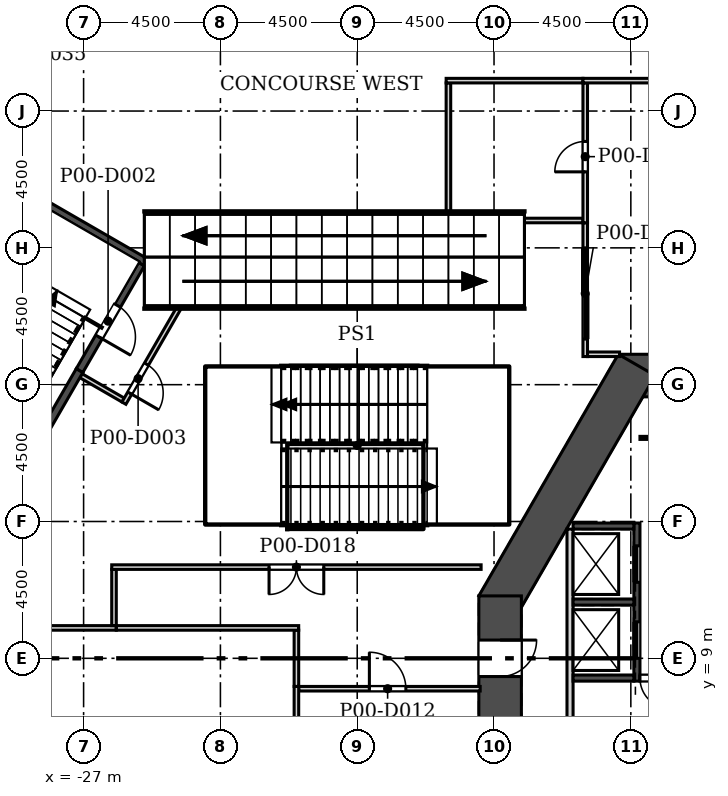
"""IFC4 building model, lengths in metres.
Left out: names, types, materials, properties, quantities, classifications, styles, units other than length and angle.
Written with IfcOpenShell. Run it as: python <this file> out.ifc"""

import sys

from ifc_helpers import new_model, si_unit, direction, frame, frame_2d, origin, place, context, subcontext, project, spatial, rectangle, extrude, element, fill, save


model = new_model("IFC4")
c1 = context("Model", 3, precision=1e-05, world=origin(), true_north=direction((0.0, 1.0)))
c2 = subcontext(c1, "Body", "Model", "MODEL_VIEW")
j1 = project(units=[si_unit("LENGTHUNIT", "METRE"), si_unit("PLANEANGLEUNIT", "RADIAN")], contexts=[c1])
p1 = place(None, origin())
s1 = spatial("IfcSite", under=j1, at=p1, CompositionType="ELEMENT")
p2 = place(p1, origin())
s2 = spatial("IfcBuilding", under=s1, at=p2, CompositionType="ELEMENT")
p3 = place(p2, origin())
s3 = spatial("IfcBuildingStorey", under=s2, at=p3, CompositionType="ELEMENT", Elevation=0.0)
p4 = place(p3, frame((9.412, 18.3, 0.0), z_axis=(0.0, 0.0, 1.0), x_axis=(-1.0, 0.0, 0.0)))
e1 = element("IfcWall", 1, at=p4, inside=s3, PredefinedType="SHEAR", context=c2, shape_type="SweptSolid", body=[
    extrude(rectangle(XDim=18.823, YDim=1.4, at=frame_2d((9.412, 0.0))), origin(), (0.0, 0.0, 1.0), 8.0),
])
p5 = place(p4, frame((8.711, 0.0, 0.0)))
e2 = element("IfcOpeningElement", 2, at=p5, cuts=e1, PredefinedType="OPENING", context=c2, shape_type="SweptSolid", body=[
    extrude(rectangle(XDim=1.4, YDim=2.1, at=frame_2d((0.7, 1.05))), frame((0.0, 0.71, 0.0), z_axis=(0.0, -1.0, 0.0), x_axis=(1.0, 0.0, 0.0)), (0.0, 0.0, 1.0), 1.42),
])
p6 = place(p4, frame((11.412, 0.0, 0.0)))
e3 = element("IfcOpeningElement", 3, at=p6, cuts=e1, PredefinedType="OPENING", context=c2, shape_type="SweptSolid", body=[
    extrude(rectangle(XDim=6.0, YDim=2.4, at=frame_2d((3.0, 1.2))), frame((0.0, 0.71, 0.0), z_axis=(0.0, -1.0, 0.0), x_axis=(1.0, 0.0, 0.0)), (0.0, 0.0, 1.0), 1.42),
])
p7 = place(p4, frame((1.412, 0.0, 0.0)))
e4 = element("IfcOpeningElement", 4, at=p7, cuts=e1, PredefinedType="OPENING", context=c2, shape_type="SweptSolid", body=[
    extrude(rectangle(XDim=6.0, YDim=2.4, at=frame_2d((3.0, 1.2))), frame((0.0, 0.71, 0.0), z_axis=(0.0, -1.0, 0.0), x_axis=(1.0, 0.0, 0.0)), (0.0, 0.0, 1.0), 1.42),
])
p8 = place(p3, frame((-8.805, 18.65, 0.0), z_axis=(0.0, 0.0, 1.0), x_axis=(-0.50000187635, -0.866024320471, 0.0)))
e5 = element("IfcWall", 5, at=p8, inside=s3, PredefinedType="SHEAR", context=c2, shape_type="SweptSolid", body=[
    extrude(rectangle(XDim=9.177, YDim=1.4, at=frame_2d((4.588, 0.0))), origin(), (0.0, 0.0, 1.0), 8.0),
])
p9 = place(p3, frame((-13.3, 11.052, 0.0), z_axis=(0.0, 0.0, 1.0), x_axis=(0.0, -1.0, 0.0)))
e6 = element("IfcWall", 6, at=p9, inside=s3, PredefinedType="SHEAR", context=c2, shape_type="SweptSolid", body=[
    extrude(rectangle(XDim=10.202, YDim=1.4, at=frame_2d((5.101, 0.0))), origin(), (0.0, 0.0, 1.0), 8.0),
])
p10 = place(p9, frame((5.453, 0.0, 0.0)))
e7 = element("IfcOpeningElement", 7, at=p10, cuts=e6, PredefinedType="OPENING", context=c2, shape_type="SweptSolid", body=[
    extrude(rectangle(XDim=1.2, YDim=2.1, at=frame_2d((0.6, 1.05))), frame((0.0, 0.71, 0.0), z_axis=(0.0, -1.0, 0.0), x_axis=(1.0, 0.0, 0.0)), (0.0, 0.0, 1.0), 1.42),
])
p11 = place(p9, frame((1.453, 0.0, 0.0)))
e8 = element("IfcOpeningElement", 8, at=p11, cuts=e6, PredefinedType="OPENING", context=c2, shape_type="SweptSolid", body=[
    extrude(rectangle(XDim=1.2, YDim=2.1, at=frame_2d((0.6, 1.05))), frame((0.0, 0.71, 0.0), z_axis=(0.0, -1.0, 0.0), x_axis=(1.0, 0.0, 0.0)), (0.0, 0.0, 1.0), 1.42),
])
p12 = place(p3, frame((-11.0, 5.85, 0.0), z_axis=(0.0, 0.0, 1.0), x_axis=(0.0, 1.0, 0.0)))
e9 = element("IfcWall", 9, at=p12, inside=s3, PredefinedType="SOLIDWALL", context=c2, shape_type="SweptSolid", body=[
    extrude(rectangle(XDim=7.4, YDim=0.2, at=frame_2d((3.7, 0.0))), origin(), (0.0, 0.0, 1.0), 7.7),
])
p13 = place(p3, frame((-8.8, 8.25, -0.4), z_axis=(0.0, 0.0, 1.0), x_axis=(0.0, 1.0, 0.0)))
e10 = element("IfcWall", 10, at=p13, inside=s3, PredefinedType="SOLIDWALL", context=c2, shape_type="SweptSolid", body=[
    extrude(rectangle(XDim=5.2, YDim=0.2, at=frame_2d((2.6, 0.0))), origin(), (0.0, 0.0, 1.0), 8.1),
])
p14 = place(p13, frame((0.75, 0.0, 0.4)))
e11 = element("IfcOpeningElement", 11, at=p14, cuts=e10, PredefinedType="OPENING", context=c2, shape_type="SweptSolid", body=[
    extrude(rectangle(XDim=1.2, YDim=2.1, at=frame_2d((0.6, 1.05))), frame((0.0, 0.11, 0.0), z_axis=(0.0, -1.0, 0.0), x_axis=(1.0, 0.0, 0.0)), (0.0, 0.0, 1.0), 0.22),
])
p15 = place(p13, frame((3.25, 0.0, 0.4)))
e12 = element("IfcOpeningElement", 12, at=p15, cuts=e10, PredefinedType="OPENING", context=c2, shape_type="SweptSolid", body=[
    extrude(rectangle(XDim=1.2, YDim=2.1, at=frame_2d((0.6, 1.05))), frame((0.0, 0.11, 0.0), z_axis=(0.0, -1.0, 0.0), x_axis=(1.0, 0.0, 0.0)), (0.0, 0.0, 1.0), 0.22),
])
for number, where, z_axis, x_axis in (
    (13, (-10.9, 8.35, -0.4), (0.0, 0.0, 1.0), (1.0, 0.0, 0.0)),
    (14, (-10.9, 10.85, -0.4), (0.0, 0.0, 1.0), (1.0, 0.0, 0.0)),
    (15, (-10.9, 13.35, -0.4), (0.0, 0.0, 1.0), (1.0, 0.0, 0.0)),
):
    element("IfcWall", number, at=place(p3, frame(where, z_axis=z_axis, x_axis=x_axis)), inside=s3, PredefinedType="SOLIDWALL", context=c2, shape_type="SweptSolid", body=[
        extrude(rectangle(XDim=2.0, YDim=0.2, at=frame_2d((1.0, 0.0))), origin(), (0.0, 0.0, 1.0), 8.1),
    ])
p16 = place(p3, frame((-8.7, 16.25, 0.0), z_axis=(0.0, 0.0, 1.0), x_axis=(1.0, 0.0, 0.0)))
e16 = element("IfcWall", 16, at=p16, inside=s3, PredefinedType="PARTITIONING", context=c2, shape_type="SweptSolid", body=[
    extrude(rectangle(XDim=2.8, YDim=0.1, at=frame_2d((1.4, 0.0))), origin(), (0.0, 0.0, 1.0), 7.7),
])
p17 = place(p16, frame((0.7, 0.0, 0.0)))
e17 = element("IfcOpeningElement", 17, at=p17, cuts=e16, PredefinedType="OPENING", context=c2, shape_type="SweptSolid", body=[
    extrude(rectangle(XDim=1.4, YDim=2.1, at=frame_2d((0.7, 1.05))), frame((0.0, 0.06, 0.0), z_axis=(0.0, -1.0, 0.0), x_axis=(1.0, 0.0, 0.0)), (0.0, 0.0, 1.0), 0.12),
])
p18 = place(p3, frame((-8.7, 8.35, 0.0), z_axis=(0.0, 0.0, 1.0), x_axis=(1.0, 0.0, 0.0)))
e18 = element("IfcWall", 18, at=p18, inside=s3, PredefinedType="SOLIDWALL", context=c2, shape_type="SweptSolid", body=[
    extrude(rectangle(XDim=2.8, YDim=0.2, at=frame_2d((1.4, 0.0))), origin(), (0.0, 0.0, 1.0), 7.7),
])
p19 = place(p18, origin())
e19 = element("IfcOpeningElement", 19, at=p19, cuts=e18, PredefinedType="OPENING", context=c2, shape_type="SweptSolid", body=[
    extrude(rectangle(XDim=1.0, YDim=2.1, at=frame_2d((0.5, 1.05))), frame((0.0, 0.11, 0.0), z_axis=(0.0, -1.0, 0.0), x_axis=(1.0, 0.0, 0.0)), (0.0, 0.0, 1.0), 0.22),
])
p20 = place(p3, frame((-19.925, 8.0, 0.0), z_axis=(0.0, 0.0, 1.0), x_axis=(1.0, 0.0, 0.0)))
e20 = element("IfcWall", 20, at=p20, inside=s3, PredefinedType="PARTITIONING", context=c2, shape_type="SweptSolid", body=[
    extrude(rectangle(XDim=5.97, YDim=0.15, at=frame_2d((2.985, 0.0))), origin(), (0.0, 0.0, 1.0), 7.7),
])
p21 = place(p20, frame((2.325, 0.0, 0.0)))
e21 = element("IfcOpeningElement", 21, at=p21, cuts=e20, PredefinedType="OPENING", context=c2, shape_type="SweptSolid", body=[
    extrude(rectangle(XDim=1.2, YDim=2.1, at=frame_2d((0.6, 1.05))), frame((0.0, 0.085, 0.0), z_axis=(0.0, -1.0, 0.0), x_axis=(1.0, 0.0, 0.0)), (0.0, 0.0, 1.0), 0.17),
])
p22 = place(p3, frame((-20.0, 8.075, 0.0), z_axis=(0.0, 0.0, 1.0), x_axis=(0.0, -1.0, 0.0)))
e22 = element("IfcWall", 22, at=p22, inside=s3, PredefinedType="PARTITIONING", context=c2, shape_type="SweptSolid", body=[
    extrude(rectangle(XDim=7.78, YDim=0.15, at=frame_2d((3.89, 0.0))), origin(), (0.0, 0.0, 1.0), 7.7),
])
p23 = place(p22, frame((3.175, 0.0, 0.0)))
e23 = element("IfcOpeningElement", 23, at=p23, cuts=e22, PredefinedType="OPENING", context=c2, shape_type="SweptSolid", body=[
    extrude(rectangle(XDim=1.8, YDim=2.1, at=frame_2d((0.9, 1.05))), frame((0.0, 0.085, 0.0), z_axis=(0.0, -1.0, 0.0), x_axis=(1.0, 0.0, 0.0)), (0.0, 0.0, 1.0), 0.17),
])
p24 = place(p3, frame((-20.0, 9.925, 0.0), z_axis=(0.0, 0.0, 1.0), x_axis=(0.0, -1.0, 0.0)))
e24 = element("IfcWall", 24, at=p24, inside=s3, PredefinedType="PARTITIONING", context=c2, shape_type="SweptSolid", body=[
    extrude(rectangle(XDim=1.85, YDim=0.15, at=frame_2d((0.925, 0.0))), origin(), (0.0, 0.0, 1.0), 7.7),
])
p25 = place(p3, frame((-41.944, 10.0, 0.0), z_axis=(0.0, 0.0, 1.0), x_axis=(1.0, 0.0, 0.0)))
e25 = element("IfcWall", 25, at=p25, inside=s3, PredefinedType="PARTITIONING", context=c2, shape_type="SweptSolid", body=[
    extrude(rectangle(XDim=16.019, YDim=0.15, at=frame_2d((8.009, 0.0))), origin(), (0.0, 0.0, 1.0), 7.7),
])
p26 = place(p25, frame((2.744, 0.0, 0.0)))
e26 = element("IfcOpeningElement", 26, at=p26, cuts=e25, PredefinedType="OPENING", context=c2, shape_type="SweptSolid", body=[
    extrude(rectangle(XDim=2.4, YDim=2.4, at=frame_2d((1.2, 1.2))), frame((0.0, 0.085, 0.0), z_axis=(0.0, -1.0, 0.0), x_axis=(1.0, 0.0, 0.0)), (0.0, 0.0, 1.0), 0.17),
])
p27 = place(p25, frame((7.244, 0.0, 0.0)))
e27 = element("IfcOpeningElement", 27, at=p27, cuts=e25, PredefinedType="OPENING", context=c2, shape_type="SweptSolid", body=[
    extrude(rectangle(XDim=2.4, YDim=2.4, at=frame_2d((1.2, 1.2))), frame((0.0, 0.085, 0.0), z_axis=(0.0, -1.0, 0.0), x_axis=(1.0, 0.0, 0.0)), (0.0, 0.0, 1.0), 0.17),
])
p28 = place(p3, frame((-25.925, 10.0, 0.0), z_axis=(0.0, 0.0, 1.0), x_axis=(1.0, 0.0, 0.0)))
e28 = element("IfcWall", 28, at=p28, inside=s3, PredefinedType="PARTITIONING", context=c2, shape_type="SweptSolid", body=[
    extrude(rectangle(XDim=6.0, YDim=0.15, at=frame_2d((3.0, 0.0))), origin(), (0.0, 0.0, 1.0), 7.7),
])
p29 = place(p3, frame((-26.0, 10.075, 0.0), z_axis=(0.0, 0.0, 1.0), x_axis=(0.0, 1.0, 0.0)))
e29 = element("IfcWall", 29, at=p29, inside=s3, PredefinedType="PARTITIONING", context=c2, shape_type="SweptSolid", body=[
    extrude(rectangle(XDim=1.85, YDim=0.15, at=frame_2d((0.925, 0.0))), origin(), (0.0, 0.0, 1.0), 7.7),
])
p30 = place(p3, frame((-26.075, 12.0, 0.0), z_axis=(0.0, 0.0, 1.0), x_axis=(1.0, 0.0, 0.0)))
e30 = element("IfcWall", 30, at=p30, inside=s3, PredefinedType="PARTITIONING", context=c2, shape_type="SweptSolid", body=[
    extrude(rectangle(XDim=12.15, YDim=0.15, at=frame_2d((6.075, 0.0))), origin(), (0.0, 0.0, 1.0), 7.7),
])
p31 = place(p30, frame((5.175, 0.0, 0.0)))
e31 = element("IfcOpeningElement", 31, at=p31, cuts=e30, PredefinedType="OPENING", context=c2, shape_type="SweptSolid", body=[
    extrude(rectangle(XDim=1.8, YDim=2.1, at=frame_2d((0.9, 1.05))), frame((0.0, 0.085, 0.0), z_axis=(0.0, -1.0, 0.0), x_axis=(1.0, 0.0, 0.0)), (0.0, 0.0, 1.0), 0.17),
])
p32 = place(p3, frame((-25.701, 17.494, 0.0), z_axis=(0.0, 0.0, 1.0), x_axis=(-0.866066190972, 0.499929347863, 0.0)))
e32 = element("IfcWall", 32, at=p32, inside=s3, PredefinedType="PARTITIONING", context=c2, shape_type="SweptSolid", body=[
    extrude(rectangle(XDim=1.6, YDim=0.15, at=frame_2d((0.8, 0.0))), origin(), (0.0, 0.0, 1.0), 7.7),
])
p33 = place(p3, frame((-27.132, 18.465, 0.0), z_axis=(0.0, 0.0, 1.0), x_axis=(-0.499985572004, -0.866033733632, 0.0)))
e33 = element("IfcWall", 33, at=p33, inside=s3, PredefinedType="SOLIDWALL", context=c2, shape_type="SweptSolid", body=[
    extrude(rectangle(XDim=7.55, YDim=0.25, at=frame_2d((3.775, 0.0))), origin(), (0.0, 0.0, 1.0), 7.7),
])
p34 = place(p3, frame((-10.5, 18.925, 0.0), z_axis=(0.0, 0.0, 1.0), x_axis=(0.0, 1.0, 0.0)))
e34 = element("IfcWall", 34, at=p34, inside=s3, PredefinedType="PARTITIONING", context=c2, shape_type="SweptSolid", body=[
    extrude(rectangle(XDim=4.4, YDim=0.15, at=frame_2d((2.2, 0.0))), origin(), (0.0, 0.0, 1.0), 7.7),
])
p35 = place(p34, frame((0.575, 0.0, 0.0)))
e35 = element("IfcOpeningElement", 35, at=p35, cuts=e34, PredefinedType="OPENING", context=c2, shape_type="SweptSolid", body=[
    extrude(rectangle(XDim=3.0, YDim=2.4, at=frame_2d((1.5, 1.2))), frame((0.0, 0.085, 0.0), z_axis=(0.0, -1.0, 0.0), x_axis=(1.0, 0.0, 0.0)), (0.0, 0.0, 1.0), 0.17),
])
p36 = place(p3, frame((-9.371, 19.0, 0.0), z_axis=(0.0, 0.0, 1.0), x_axis=(-1.0, 0.0, 0.0)))
e36 = element("IfcWall", 36, at=p36, inside=s3, PredefinedType="PARTITIONING", context=c2, shape_type="SweptSolid", body=[
    extrude(rectangle(XDim=1.054, YDim=0.15, at=frame_2d((0.527, 0.0))), origin(), (0.0, 0.0, 1.0), 7.7),
])
p37 = place(p3, frame((-23.841, 20.565, 0.0), z_axis=(0.0, 0.0, 1.0), x_axis=(-0.499958946799, -0.866049104564, 0.0)))
e37 = element("IfcWall", 37, at=p37, inside=s3, PredefinedType="PARTITIONING", context=c2, shape_type="SweptSolid", body=[
    extrude(rectangle(XDim=3.664, YDim=0.15, at=frame_2d((1.832, 0.0))), origin(), (0.0, 0.0, 1.0), 7.7),
])
p38 = place(p37, frame((2.182, 0.0, 0.0)))
e38 = element("IfcOpeningElement", 38, at=p38, cuts=e37, PredefinedType="OPENING", context=c2, shape_type="SweptSolid", body=[
    extrude(rectangle(XDim=1.1, YDim=2.1, at=frame_2d((0.55, 1.05))), frame((0.0, 0.085, 0.0), z_axis=(0.0, -1.0, 0.0), x_axis=(1.0, 0.0, 0.0)), (0.0, 0.0, 1.0), 0.17),
])
p39 = place(p3, frame((-25.107, 21.972, 0.0), z_axis=(0.0, 0.0, 1.0), x_axis=(-0.499971214291, -0.866042022584, 0.0)))
e39 = element("IfcWall", 39, at=p39, inside=s3, PredefinedType="SOLIDWALL", context=c2, shape_type="SweptSolid", body=[
    extrude(rectangle(XDim=4.05, YDim=0.25, at=frame_2d((2.025, 0.0))), origin(), (0.0, 0.0, 1.0), 7.7),
])
p40 = place(p39, frame((1.575, 0.0, 0.0)))
e40 = element("IfcOpeningElement", 40, at=p40, cuts=e39, PredefinedType="OPENING", context=c2, shape_type="SweptSolid", body=[
    extrude(rectangle(XDim=1.2, YDim=2.1, at=frame_2d((0.6, 1.05))), frame((0.0, 0.135, 0.0), z_axis=(0.0, -1.0, 0.0), x_axis=(1.0, 0.0, 0.0)), (0.0, 0.0, 1.0), 0.27),
])
p41 = place(p3, frame((-10.575, 23.4, 0.0), z_axis=(0.0, 0.0, 1.0), x_axis=(-1.0, 0.0, 0.0)))
e41 = element("IfcWall", 41, at=p41, inside=s3, PredefinedType="PARTITIONING", context=c2, shape_type="SweptSolid", body=[
    extrude(rectangle(XDim=2.0, YDim=0.15, at=frame_2d((1.0, 0.0))), origin(), (0.0, 0.0, 1.0), 7.7),
])
p42 = place(p3, frame((-15.0, 23.625, 0.0), z_axis=(0.0, 0.0, 1.0), x_axis=(0.0, 1.0, 0.0)))
e42 = element("IfcWall", 42, at=p42, inside=s3, PredefinedType="PARTITIONING", context=c2, shape_type="SweptSolid", body=[
    extrude(rectangle(XDim=4.3, YDim=0.15, at=frame_2d((2.15, 0.0))), origin(), (0.0, 0.0, 1.0), 7.7),
])
p43 = place(p3, frame((-30.652, 25.318, 0.0), z_axis=(0.0, 0.0, 1.0), x_axis=(0.866049458236, -0.499958334153, 0.0)))
e43 = element("IfcWall", 43, at=p43, inside=s3, PredefinedType="SOLIDWALL", context=c2, shape_type="SweptSolid", body=[
    extrude(rectangle(XDim=6.6, YDim=0.25, at=frame_2d((3.3, 0.0))), origin(), (0.0, 0.0, 1.0), 7.7),
])
p44 = place(p3, frame((-10.5, 27.925, 0.0), z_axis=(0.0, 0.0, 1.0), x_axis=(0.0, -1.0, 0.0)))
e44 = element("IfcWall", 44, at=p44, inside=s3, PredefinedType="PARTITIONING", context=c2, shape_type="SweptSolid", body=[
    extrude(rectangle(XDim=4.6, YDim=0.15, at=frame_2d((2.3, 0.0))), origin(), (0.0, 0.0, 1.0), 7.7),
])
p45 = place(p44, frame((1.925, 0.0, 0.0)))
e45 = element("IfcOpeningElement", 45, at=p45, cuts=e44, PredefinedType="OPENING", context=c2, shape_type="SweptSolid", body=[
    extrude(rectangle(XDim=1.0, YDim=2.1, at=frame_2d((0.5, 1.05))), frame((0.0, 0.085, 0.0), z_axis=(0.0, -1.0, 0.0), x_axis=(1.0, 0.0, 0.0)), (0.0, 0.0, 1.0), 0.17),
])
p46 = place(p3, frame((-15.075, 28.0, 0.0), z_axis=(0.0, 0.0, 1.0), x_axis=(1.0, 0.0, 0.0)))
e46 = element("IfcWall", 46, at=p46, inside=s3, PredefinedType="PARTITIONING", context=c2, shape_type="SweptSolid", body=[
    extrude(rectangle(XDim=4.5, YDim=0.15, at=frame_2d((2.25, 0.0))), origin(), (0.0, 0.0, 1.0), 7.7),
])
p47 = place(p3, frame((-10.575, 28.0, 0.0), z_axis=(0.0, 0.0, 1.0), x_axis=(1.0, 0.0, 0.0)))
e47 = element("IfcWall", 47, at=p47, inside=s3, PredefinedType="PARTITIONING", context=c2, shape_type="SweptSolid", body=[
    extrude(rectangle(XDim=6.65, YDim=0.15, at=frame_2d((3.325, 0.0))), origin(), (0.0, 0.0, 1.0), 7.7),
])
p48 = place(p47, frame((2.475, 0.0, 0.0)))
e48 = element("IfcOpeningElement", 48, at=p48, cuts=e47, PredefinedType="OPENING", context=c2, shape_type="SweptSolid", body=[
    extrude(rectangle(XDim=3.0, YDim=2.4, at=frame_2d((1.5, 1.2))), frame((0.0, 0.085, 0.0), z_axis=(0.0, -1.0, 0.0), x_axis=(1.0, 0.0, 0.0)), (0.0, 0.0, 1.0), 0.17),
])
p49 = place(p3, frame((-22.875, 13.45, 0.0), z_axis=(0.0, 0.0, 1.0), x_axis=(0.0, 1.0, 0.0)))
e49 = element("IfcWall", 49, at=p49, inside=s3, PredefinedType="SOLIDWALL", context=c2, shape_type="SweptSolid", body=[
    extrude(rectangle(XDim=5.1, YDim=0.25, at=frame_2d((2.55, 0.0))), origin(), (0.0, 0.0, 1.0), 2.409),
])
for number, where, z_axis, x_axis in (
    (50, (-22.875, 13.525, 0.0), (0.0, 0.0, 1.0), (1.0, 0.0, 0.0)),
    (51, (-22.875, 18.475, 0.0), (0.0, 0.0, 1.0), (1.0, 0.0, 0.0)),
):
    element("IfcWall", number, at=place(p3, frame(where, z_axis=z_axis, x_axis=x_axis)), inside=s3, PredefinedType="SOLIDWALL", context=c2, shape_type="SweptSolid", body=[
        extrude(rectangle(XDim=2.25, YDim=0.25, at=frame_2d((1.125, 0.0))), origin(), (0.0, 0.0, 1.0), 2.409),
    ])
p50 = place(p3, frame((-13.125, 13.45, 0.0), z_axis=(0.0, 0.0, 1.0), x_axis=(0.0, 1.0, 0.0)))
e52 = element("IfcWall", 52, at=p50, inside=s3, PredefinedType="SOLIDWALL", context=c2, shape_type="SweptSolid", body=[
    extrude(rectangle(XDim=5.1, YDim=0.25, at=frame_2d((2.55, 0.0))), origin(), (0.0, 0.0, 1.0), 7.7),
])
for number, where, z_axis, x_axis in (
    (53, (-13.125, 13.525, 0.0), (0.0, 0.0, 1.0), (-1.0, 0.0, 0.0)),
    (54, (-13.125, 18.475, 0.0), (0.0, 0.0, 1.0), (-1.0, 0.0, 0.0)),
):
    element("IfcWall", number, at=place(p3, frame(where, z_axis=z_axis, x_axis=x_axis)), inside=s3, PredefinedType="SOLIDWALL", context=c2, shape_type="SweptSolid", body=[
        extrude(rectangle(XDim=2.45, YDim=0.25, at=frame_2d((1.225, 0.0))), origin(), (0.0, 0.0, 1.0), 7.7),
    ])
p51 = place(p14, origin())
e55 = element("IfcDoor", 55, at=p51, inside=s3, OperationType="SLIDING_TO_LEFT", PredefinedType="DOOR", context=c2, shape_type="SweptSolid", body=[
    extrude(rectangle(XDim=1.2, YDim=2.1, at=frame_2d((0.6, 1.05))), frame((0.0, 0.025, 0.0), z_axis=(0.0, -1.0, 0.0), x_axis=(1.0, 0.0, 0.0)), (0.0, 0.0, 1.0), 0.05),
])
fill(e11, e55)
p52 = place(p15, origin())
e56 = element("IfcDoor", 56, at=p52, inside=s3, OperationType="SLIDING_TO_LEFT", PredefinedType="DOOR", context=c2, shape_type="SweptSolid", body=[
    extrude(rectangle(XDim=1.2, YDim=2.1, at=frame_2d((0.6, 1.05))), frame((0.0, 0.025, 0.0), z_axis=(0.0, -1.0, 0.0), x_axis=(1.0, 0.0, 0.0)), (0.0, 0.0, 1.0), 0.05),
])
fill(e12, e56)
p53 = place(p19, frame((1.0, 0.0, 0.0), z_axis=(0.0, 0.0, 1.0), x_axis=(-1.0, 0.0, 0.0)))
e57 = element("IfcDoor", 57, at=p53, inside=s3, OperationType="SINGLE_SWING_LEFT", PredefinedType="DOOR", context=c2, shape_type="SweptSolid", body=[
    extrude(rectangle(XDim=1.0, YDim=2.1, at=frame_2d((0.5, 1.05))), frame((0.0, 0.025, 0.0), z_axis=(0.0, -1.0, 0.0), x_axis=(1.0, 0.0, 0.0)), (0.0, 0.0, 1.0), 0.05),
])
fill(e19, e57)
p54 = place(p11, origin())
e58 = element("IfcDoor", 58, at=p54, inside=s3, OperationType="SINGLE_SWING_LEFT", PredefinedType="DOOR", context=c2, shape_type="SweptSolid", body=[
    extrude(rectangle(XDim=1.2, YDim=2.1, at=frame_2d((0.6, 1.05))), frame((0.0, 0.025, 0.0), z_axis=(0.0, -1.0, 0.0), x_axis=(1.0, 0.0, 0.0)), (0.0, 0.0, 1.0), 0.05),
])
fill(e8, e58)
p55 = place(p40, origin())
e59 = element("IfcDoor", 59, at=p55, inside=s3, OperationType="SINGLE_SWING_RIGHT", PredefinedType="DOOR", context=c2, shape_type="SweptSolid", body=[
    extrude(rectangle(XDim=1.2, YDim=2.1, at=frame_2d((0.6, 1.05))), frame((0.0, 0.025, 0.0), z_axis=(0.0, -1.0, 0.0), x_axis=(1.0, 0.0, 0.0)), (0.0, 0.0, 1.0), 0.05),
])
fill(e40, e59)
p56 = place(p38, origin())
e60 = element("IfcDoor", 60, at=p56, inside=s3, OperationType="SINGLE_SWING_RIGHT", PredefinedType="DOOR", context=c2, shape_type="SweptSolid", body=[
    extrude(rectangle(XDim=1.1, YDim=2.1, at=frame_2d((0.55, 1.05))), frame((0.0, 0.025, 0.0), z_axis=(0.0, -1.0, 0.0), x_axis=(1.0, 0.0, 0.0)), (0.0, 0.0, 1.0), 0.05),
])
fill(e38, e60)
p57 = place(p21, origin())
e61 = element("IfcDoor", 61, at=p57, inside=s3, OperationType="SINGLE_SWING_LEFT", PredefinedType="DOOR", context=c2, shape_type="SweptSolid", body=[
    extrude(rectangle(XDim=1.2, YDim=2.1, at=frame_2d((0.6, 1.05))), frame((0.0, 0.025, 0.0), z_axis=(0.0, -1.0, 0.0), x_axis=(1.0, 0.0, 0.0)), (0.0, 0.0, 1.0), 0.05),
])
fill(e21, e61)
p58 = place(p31, frame((1.8, 0.0, 0.0), z_axis=(0.0, 0.0, 1.0), x_axis=(-1.0, 0.0, 0.0)))
e62 = element("IfcDoor", 62, at=p58, inside=s3, OperationType="DOUBLE_DOOR_SINGLE_SWING", PredefinedType="DOOR", context=c2, shape_type="SweptSolid", body=[
    extrude(rectangle(XDim=1.8, YDim=2.1, at=frame_2d((0.9, 1.05))), frame((0.0, 0.025, 0.0), z_axis=(0.0, -1.0, 0.0), x_axis=(1.0, 0.0, 0.0)), (0.0, 0.0, 1.0), 0.05),
])
fill(e31, e62)
p59 = place(p35, origin())
e63 = element("IfcDoor", 63, at=p59, inside=s3, OperationType="DOUBLE_DOOR_SLIDING", PredefinedType="DOOR", context=c2, shape_type="SweptSolid", body=[
    extrude(rectangle(XDim=3.0, YDim=2.4, at=frame_2d((1.5, 1.2))), frame((0.0, 0.025, 0.0), z_axis=(0.0, -1.0, 0.0), x_axis=(1.0, 0.0, 0.0)), (0.0, 0.0, 1.0), 0.05),
])
fill(e35, e63)
p60 = place(p45, frame((1.0, 0.0, 0.0), z_axis=(0.0, 0.0, 1.0), x_axis=(-1.0, 0.0, 0.0)))
e64 = element("IfcDoor", 64, at=p60, inside=s3, OperationType="SINGLE_SWING_LEFT", PredefinedType="DOOR", context=c2, shape_type="SweptSolid", body=[
    extrude(rectangle(XDim=1.0, YDim=2.1, at=frame_2d((0.5, 1.05))), frame((0.0, 0.025, 0.0), z_axis=(0.0, -1.0, 0.0), x_axis=(1.0, 0.0, 0.0)), (0.0, 0.0, 1.0), 0.05),
])
fill(e45, e64)
save(model, sys.argv[1])
